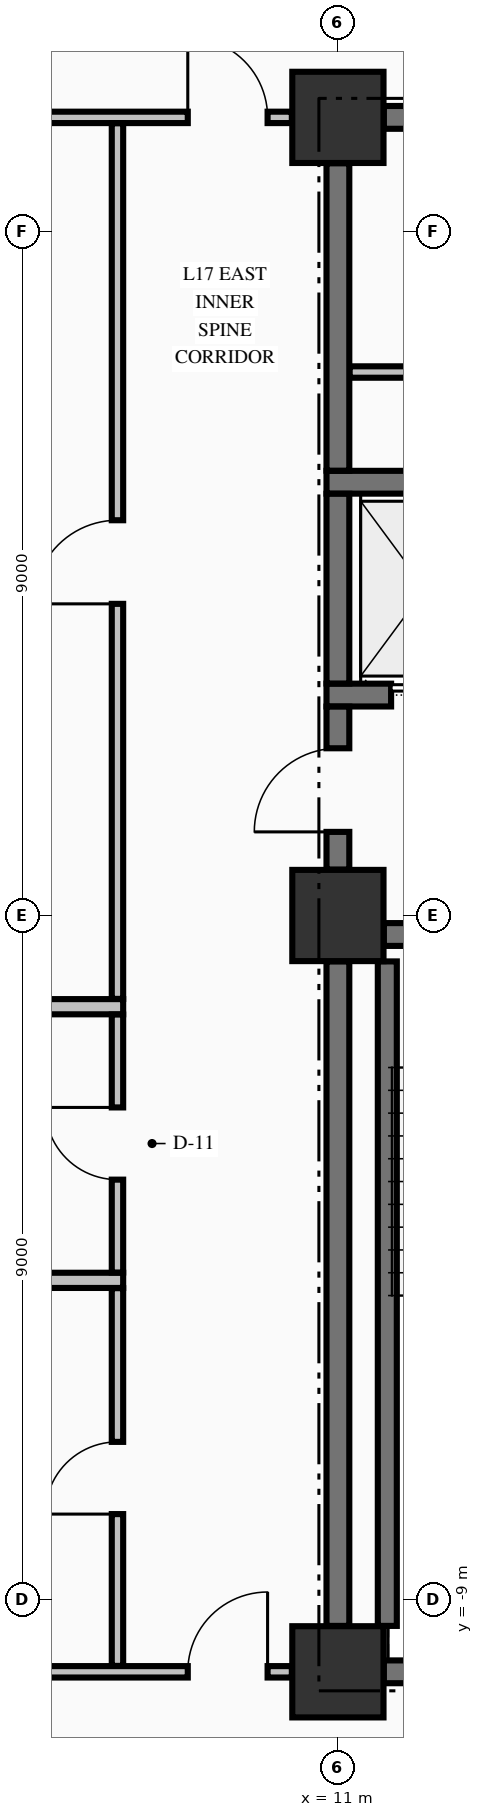
"""IFC4 building model, lengths in metres.
Left out: names, types, materials, properties, quantities, classifications, styles, units other than length and angle.
Written with IfcOpenShell. Run it as: python <this file> out.ifc"""

import sys

from ifc_helpers import new_model, si_unit, direction, frame, frame_2d, origin, origin_2d, place, context, subcontext, project, spatial, rectangle, extrude, element, fill, save


model = new_model("IFC4")
c1 = context("Model", 3, precision=1e-05, world=origin(), true_north=direction((0.0, 1.0)))
c2 = subcontext(c1, "Body", "Model", "MODEL_VIEW")
j1 = project(units=[si_unit("LENGTHUNIT", "METRE"), si_unit("PLANEANGLEUNIT", "RADIAN")], contexts=[c1])
p1 = place(None, origin())
s1 = spatial("IfcSite", under=j1, at=p1, CompositionType="ELEMENT")
p2 = place(p1, origin())
s2 = spatial("IfcBuilding", under=s1, at=p2, CompositionType="ELEMENT")
p3 = place(p2, frame((0.0, 0.0, 71.47)))
s3 = spatial("IfcBuildingStorey", under=s2, at=p3, CompositionType="ELEMENT", Elevation=71.47)
for number, where, z_axis, x_axis in (
    (1, (11.0, -9.95, -0.325), (0.0, 0.0, 1.0), (1.0, 0.0, 0.0)),
    (2, (11.0, 0.0, -0.325), (0.0, 0.0, 1.0), (1.0, 0.0, 0.0)),
    (3, (11.0, 10.5, -0.325), (0.0, 0.0, 1.0), (1.0, 0.0, 0.0)),
):
    element("IfcColumn", number, at=place(p3, frame(where, z_axis=z_axis, x_axis=x_axis)), inside=s3, PredefinedType="COLUMN", context=c2, shape_type="SweptSolid", body=[
        extrude(rectangle(XDim=1.2, YDim=1.2, at=origin_2d()), origin(), (0.0, 0.0, 1.0), 3.645),
    ])
p4 = place(p3, frame((11.604, -9.95, 0.0), z_axis=(0.0, 0.0, 1.0), x_axis=(1.0, 0.0, 0.0)))
e4 = element("IfcWall", 4, at=p4, inside=s3, PredefinedType="SHEAR", context=c2, shape_type="SweptSolid", body=[
    extrude(rectangle(XDim=3.096, YDim=0.3, at=frame_2d((1.548, 0.0))), origin(), (0.0, 0.0, 1.0), 3.32),
])
p5 = place(p3, frame((11.604, -0.25, 0.0), z_axis=(0.0, 0.0, 1.0), x_axis=(1.0, 0.0, 0.0)))
e5 = element("IfcWall", 5, at=p5, inside=s3, PredefinedType="SHEAR", context=c2, shape_type="SweptSolid", body=[
    extrude(rectangle(XDim=3.271, YDim=0.3, at=frame_2d((1.635, 0.0))), origin(), (0.0, 0.0, 1.0), 3.32),
])
p6 = place(p5, frame((0.996, 0.0, 0.0)))
e6 = element("IfcOpeningElement", 6, at=p6, cuts=e5, PredefinedType="OPENING", context=c2, shape_type="SweptSolid", body=[
    extrude(rectangle(XDim=1.1, YDim=2.15, at=frame_2d((0.55, 1.075))), frame((0.0, 0.16, 0.0), z_axis=(0.0, -1.0, 0.0), x_axis=(1.0, 0.0, 0.0)), (0.0, 0.0, 1.0), 0.32),
])
p7 = place(p3, frame((10.85, 2.9, 0.0), z_axis=(0.0, 0.0, 1.0), x_axis=(1.0, 0.0, 0.0)))
e7 = element("IfcWall", 7, at=p7, inside=s3, PredefinedType="SHEAR", context=c2, shape_type="SweptSolid", body=[
    extrude(rectangle(XDim=4.025, YDim=0.3, at=frame_2d((2.012, 0.0))), origin(), (0.0, 0.0, 1.0), 3.32),
])
p8 = place(p7, frame((0.85, 0.0, 0.0)))
e8 = element("IfcOpeningElement", 8, at=p8, cuts=e7, PredefinedType="OPENING", context=c2, shape_type="SweptSolid", body=[
    extrude(rectangle(XDim=1.1, YDim=2.2, at=frame_2d((0.55, 1.1))), frame((0.0, 0.16, 0.0), z_axis=(0.0, -1.0, 0.0), x_axis=(1.0, 0.0, 0.0)), (0.0, 0.0, 1.0), 0.32),
])
p9 = place(p3, frame((10.85, 5.7, 0.0), z_axis=(0.0, 0.0, 1.0), x_axis=(1.0, 0.0, 0.0)))
e9 = element("IfcWall", 9, at=p9, inside=s3, PredefinedType="SHEAR", context=c2, shape_type="SweptSolid", body=[
    extrude(rectangle(XDim=4.025, YDim=0.3, at=frame_2d((2.012, 0.0))), origin(), (0.0, 0.0, 1.0), 3.32),
])
p10 = place(p3, frame((11.604, 10.5, 0.0), z_axis=(0.0, 0.0, 1.0), x_axis=(1.0, 0.0, 0.0)))
e10 = element("IfcWall", 10, at=p10, inside=s3, PredefinedType="SHEAR", context=c2, shape_type="SweptSolid", body=[
    extrude(rectangle(XDim=3.096, YDim=0.3, at=frame_2d((1.548, 0.0))), origin(), (0.0, 0.0, 1.0), 3.32),
])
p11 = place(p10, frame((1.841, 0.0, 0.0)))
e11 = element("IfcOpeningElement", 11, at=p11, cuts=e10, PredefinedType="OPENING", context=c2, shape_type="SweptSolid", body=[
    extrude(rectangle(XDim=0.95, YDim=2.15, at=frame_2d((0.475, 1.075))), frame((0.0, 0.16, 0.0), z_axis=(0.0, -1.0, 0.0), x_axis=(1.0, 0.0, 0.0)), (0.0, 0.0, 1.0), 0.32),
])
p12 = place(p3, frame((-10.394, -9.95, 0.0), z_axis=(0.0, 0.0, 1.0), x_axis=(1.0, 0.0, 0.0)))
e12 = element("IfcWall", 12, at=p12, inside=s3, PredefinedType="PARTITIONING", context=c2, shape_type="SweptSolid", body=[
    extrude(rectangle(XDim=20.788, YDim=0.15, at=frame_2d((10.394, 0.0))), origin(), (0.0, 0.0, 1.0), 3.32),
])
p13 = place(p12, frame((0.319, 0.0, 0.0)))
e13 = element("IfcOpeningElement", 13, at=p13, cuts=e12, PredefinedType="OPENING", context=c2, shape_type="SweptSolid", body=[
    extrude(rectangle(XDim=1.05, YDim=2.15, at=frame_2d((0.525, 1.075))), frame((0.0, 0.085, 0.0), z_axis=(0.0, -1.0, 0.0), x_axis=(1.0, 0.0, 0.0)), (0.0, 0.0, 1.0), 0.17),
])
p14 = place(p12, frame((19.419, 0.0, 0.0)))
e14 = element("IfcOpeningElement", 14, at=p14, cuts=e12, PredefinedType="OPENING", context=c2, shape_type="SweptSolid", body=[
    extrude(rectangle(XDim=1.05, YDim=2.15, at=frame_2d((0.525, 1.075))), frame((0.0, 0.085, 0.0), z_axis=(0.0, -1.0, 0.0), x_axis=(1.0, 0.0, 0.0)), (0.0, 0.0, 1.0), 0.17),
])
p15 = place(p12, frame((11.569, 0.0, 0.0)))
e15 = element("IfcOpeningElement", 15, at=p15, cuts=e12, PredefinedType="OPENING", context=c2, shape_type="SweptSolid", body=[
    extrude(rectangle(XDim=0.95, YDim=2.15, at=frame_2d((0.475, 1.075))), frame((0.0, 0.085, 0.0), z_axis=(0.0, -1.0, 0.0), x_axis=(1.0, 0.0, 0.0)), (0.0, 0.0, 1.0), 0.17),
])
for number, where, z_axis, x_axis in (
    (16, (-1.9, -4.8, 0.0), (0.0, 0.0, 1.0), (1.0, 0.0, 0.0)),
    (17, (-1.9, -1.2, 0.0), (0.0, 0.0, 1.0), (1.0, 0.0, 0.0)),
):
    element("IfcWall", number, at=place(p3, frame(where, z_axis=z_axis, x_axis=x_axis)), inside=s3, PredefinedType="PARTITIONING", context=c2, shape_type="SweptSolid", body=[
        extrude(rectangle(XDim=10.075, YDim=0.2, at=frame_2d((5.038, 0.0))), origin(), (0.0, 0.0, 1.0), 3.32),
    ])
p16 = place(p3, frame((11.153, 7.15, 0.0), z_axis=(0.0, 0.0, 1.0), x_axis=(1.0, 0.0, 0.0)))
e18 = element("IfcWall", 18, at=p16, inside=s3, PredefinedType="PARTITIONING", context=c2, shape_type="SweptSolid", body=[
    extrude(rectangle(XDim=2.072, YDim=0.15, at=frame_2d((1.036, 0.0))), origin(), (0.0, 0.0, 1.0), 3.32),
])
p17 = place(p3, frame((-10.394, 10.5, 0.0), z_axis=(0.0, 0.0, 1.0), x_axis=(1.0, 0.0, 0.0)))
e19 = element("IfcWall", 19, at=p17, inside=s3, PredefinedType="PARTITIONING", context=c2, shape_type="SweptSolid", body=[
    extrude(rectangle(XDim=20.788, YDim=0.15, at=frame_2d((10.394, 0.0))), origin(), (0.0, 0.0, 1.0), 3.32),
])
p18 = place(p17, frame((0.319, 0.0, 0.0)))
e20 = element("IfcOpeningElement", 20, at=p18, cuts=e19, PredefinedType="OPENING", context=c2, shape_type="SweptSolid", body=[
    extrude(rectangle(XDim=1.05, YDim=2.15, at=frame_2d((0.525, 1.075))), frame((0.0, 0.085, 0.0), z_axis=(0.0, -1.0, 0.0), x_axis=(1.0, 0.0, 0.0)), (0.0, 0.0, 1.0), 0.17),
])
p19 = place(p17, frame((19.419, 0.0, 0.0)))
e21 = element("IfcOpeningElement", 21, at=p19, cuts=e19, PredefinedType="OPENING", context=c2, shape_type="SweptSolid", body=[
    extrude(rectangle(XDim=1.05, YDim=2.15, at=frame_2d((0.525, 1.075))), frame((0.0, 0.085, 0.0), z_axis=(0.0, -1.0, 0.0), x_axis=(1.0, 0.0, 0.0)), (0.0, 0.0, 1.0), 0.17),
])
p20 = place(p3, frame((11.0, -9.346, 0.0), z_axis=(0.0, 0.0, 1.0), x_axis=(0.0, 1.0, 0.0)))
e22 = element("IfcWall", 22, at=p20, inside=s3, PredefinedType="SHEAR", context=c2, shape_type="SweptSolid", body=[
    extrude(rectangle(XDim=8.742, YDim=0.3, at=frame_2d((4.371, 0.0))), origin(), (0.0, 0.0, 1.0), 3.32),
])
p21 = place(p3, frame((11.0, 0.604, 0.0), z_axis=(0.0, 0.0, 1.0), x_axis=(0.0, 1.0, 0.0)))
e23 = element("IfcWall", 23, at=p21, inside=s3, PredefinedType="SHEAR", context=c2, shape_type="SweptSolid", body=[
    extrude(rectangle(XDim=2.144, YDim=0.3, at=frame_2d((1.072, 0.0))), origin(), (0.0, 0.0, 1.0), 3.32),
])
p22 = place(p21, frame((0.496, 0.0, 0.0)))
e24 = element("IfcOpeningElement", 24, at=p22, cuts=e23, PredefinedType="OPENING", context=c2, shape_type="SweptSolid", body=[
    extrude(rectangle(XDim=1.1, YDim=2.15, at=frame_2d((0.55, 1.075))), frame((0.0, 0.16, 0.0), z_axis=(0.0, -1.0, 0.0), x_axis=(1.0, 0.0, 0.0)), (0.0, 0.0, 1.0), 0.32),
])
p23 = place(p3, frame((11.0, 3.052, 0.0), z_axis=(0.0, 0.0, 1.0), x_axis=(0.0, 1.0, 0.0)))
e25 = element("IfcWall", 25, at=p23, inside=s3, PredefinedType="SHEAR", context=c2, shape_type="SweptSolid", body=[
    extrude(rectangle(XDim=2.496, YDim=0.3, at=frame_2d((1.248, 0.0))), origin(), (0.0, 0.0, 1.0), 3.32),
])
p24 = place(p3, frame((11.0, 5.852, 0.0), z_axis=(0.0, 0.0, 1.0), x_axis=(0.0, 1.0, 0.0)))
e26 = element("IfcWall", 26, at=p24, inside=s3, PredefinedType="SHEAR", context=c2, shape_type="SweptSolid", body=[
    extrude(rectangle(XDim=4.044, YDim=0.3, at=frame_2d((2.022, 0.0))), origin(), (0.0, 0.0, 1.0), 3.32),
])
p25 = place(p3, frame((11.65, -9.346, 0.0), z_axis=(0.0, 0.0, 1.0), x_axis=(0.0, 1.0, 0.0)))
e27 = element("IfcWall", 27, at=p25, inside=s3, PredefinedType="SOLIDWALL", context=c2, shape_type="SweptSolid", body=[
    extrude(rectangle(XDim=8.742, YDim=0.25, at=frame_2d((4.371, 0.0))), origin(), (0.0, 0.0, 1.0), 3.32),
])
p26 = place(p3, frame((8.1, -9.872, 0.0), z_axis=(0.0, 0.0, 1.0), x_axis=(0.0, 1.0, 0.0)))
e28 = element("IfcWall", 28, at=p26, inside=s3, PredefinedType="PARTITIONING", context=c2, shape_type="SweptSolid", body=[
    extrude(rectangle(XDim=4.969, YDim=0.15, at=frame_2d((2.484, 0.0))), origin(), (0.0, 0.0, 1.0), 3.32),
])
p27 = place(p26, frame((1.997, 0.0, 0.0)))
e29 = element("IfcOpeningElement", 29, at=p27, cuts=e28, PredefinedType="OPENING", context=c2, shape_type="SweptSolid", body=[
    extrude(rectangle(XDim=0.95, YDim=2.15, at=frame_2d((0.475, 1.075))), frame((0.0, 0.085, 0.0), z_axis=(0.0, -1.0, 0.0), x_axis=(1.0, 0.0, 0.0)), (0.0, 0.0, 1.0), 0.17),
])
p28 = place(p3, frame((8.1, -4.697, 0.0), z_axis=(0.0, 0.0, 1.0), x_axis=(0.0, 1.0, 0.0)))
e30 = element("IfcWall", 30, at=p28, inside=s3, PredefinedType="PARTITIONING", context=c2, shape_type="SweptSolid", body=[
    extrude(rectangle(XDim=3.394, YDim=0.15, at=frame_2d((1.697, 0.0))), origin(), (0.0, 0.0, 1.0), 3.32),
])
p29 = place(p28, frame((1.222, 0.0, 0.0)))
e31 = element("IfcOpeningElement", 31, at=p29, cuts=e30, PredefinedType="OPENING", context=c2, shape_type="SweptSolid", body=[
    extrude(rectangle(XDim=0.95, YDim=2.15, at=frame_2d((0.475, 1.075))), frame((0.0, 0.085, 0.0), z_axis=(0.0, -1.0, 0.0), x_axis=(1.0, 0.0, 0.0)), (0.0, 0.0, 1.0), 0.17),
])
p30 = place(p3, frame((8.1, -1.097, 0.0), z_axis=(0.0, 0.0, 1.0), x_axis=(0.0, 1.0, 0.0)))
e32 = element("IfcWall", 32, at=p30, inside=s3, PredefinedType="PARTITIONING", context=c2, shape_type="SweptSolid", body=[
    extrude(rectangle(XDim=11.519, YDim=0.15, at=frame_2d((5.76, 0.0))), origin(), (0.0, 0.0, 1.0), 3.32),
])
p31 = place(p30, frame((5.197, 0.0, 0.0)))
e33 = element("IfcOpeningElement", 33, at=p31, cuts=e32, PredefinedType="OPENING", context=c2, shape_type="SweptSolid", body=[
    extrude(rectangle(XDim=1.1, YDim=2.15, at=frame_2d((0.55, 1.075))), frame((0.0, 0.085, 0.0), z_axis=(0.0, -1.0, 0.0), x_axis=(1.0, 0.0, 0.0)), (0.0, 0.0, 1.0), 0.17),
])
p32 = place(p22, origin())
e34 = element("IfcDoor", 34, at=p32, inside=s3, OperationType="SINGLE_SWING_LEFT", PredefinedType="DOOR", context=c2, shape_type="SweptSolid", body=[
    extrude(rectangle(XDim=1.1, YDim=2.15, at=frame_2d((0.55, 1.075))), frame((0.0, 0.025, 0.0), z_axis=(0.0, -1.0, 0.0), x_axis=(1.0, 0.0, 0.0)), (0.0, 0.0, 1.0), 0.05),
])
fill(e24, e34)
p33 = place(p8, origin())
e35 = element("IfcDoor", 35, at=p33, inside=s3, OperationType="SLIDING_TO_RIGHT", PredefinedType="DOOR", context=c2, shape_type="SweptSolid", body=[
    extrude(rectangle(XDim=1.1, YDim=2.2, at=frame_2d((0.55, 1.1))), frame((0.0, 0.025, 0.0), z_axis=(0.0, -1.0, 0.0), x_axis=(1.0, 0.0, 0.0)), (0.0, 0.0, 1.0), 0.05),
])
fill(e8, e35)
p34 = place(p19, origin())
e36 = element("IfcDoor", 36, at=p34, inside=s3, OperationType="SINGLE_SWING_LEFT", PredefinedType="DOOR", context=c2, shape_type="SweptSolid", body=[
    extrude(rectangle(XDim=1.05, YDim=2.15, at=frame_2d((0.525, 1.075))), frame((0.0, 0.025, 0.0), z_axis=(0.0, -1.0, 0.0), x_axis=(1.0, 0.0, 0.0)), (0.0, 0.0, 1.0), 0.05),
])
fill(e21, e36)
p35 = place(p14, origin())
e37 = element("IfcDoor", 37, at=p35, inside=s3, OperationType="SINGLE_SWING_RIGHT", PredefinedType="DOOR", context=c2, shape_type="SweptSolid", body=[
    extrude(rectangle(XDim=1.05, YDim=2.15, at=frame_2d((0.525, 1.075))), frame((0.0, 0.025, 0.0), z_axis=(0.0, -1.0, 0.0), x_axis=(1.0, 0.0, 0.0)), (0.0, 0.0, 1.0), 0.05),
])
fill(e14, e37)
p36 = place(p31, origin())
e38 = element("IfcDoor", 38, at=p36, inside=s3, OperationType="SINGLE_SWING_LEFT", PredefinedType="DOOR", context=c2, shape_type="SweptSolid", body=[
    extrude(rectangle(XDim=1.1, YDim=2.15, at=frame_2d((0.55, 1.075))), frame((0.0, 0.025, 0.0), z_axis=(0.0, -1.0, 0.0), x_axis=(1.0, 0.0, 0.0)), (0.0, 0.0, 1.0), 0.05),
])
fill(e33, e38)
p37 = place(p29, origin())
e39 = element("IfcDoor", 39, at=p37, inside=s3, OperationType="SINGLE_SWING_RIGHT", PredefinedType="DOOR", context=c2, shape_type="SweptSolid", body=[
    extrude(rectangle(XDim=0.95, YDim=2.15, at=frame_2d((0.475, 1.075))), frame((0.0, 0.025, 0.0), z_axis=(0.0, -1.0, 0.0), x_axis=(1.0, 0.0, 0.0)), (0.0, 0.0, 1.0), 0.05),
])
fill(e31, e39)
p38 = place(p27, origin())
e40 = element("IfcDoor", 40, at=p38, inside=s3, OperationType="SINGLE_SWING_LEFT", PredefinedType="DOOR", context=c2, shape_type="SweptSolid", body=[
    extrude(rectangle(XDim=0.95, YDim=2.15, at=frame_2d((0.475, 1.075))), frame((0.0, 0.025, 0.0), z_axis=(0.0, -1.0, 0.0), x_axis=(1.0, 0.0, 0.0)), (0.0, 0.0, 1.0), 0.05),
])
fill(e29, e40)
save(model, sys.argv[1])
